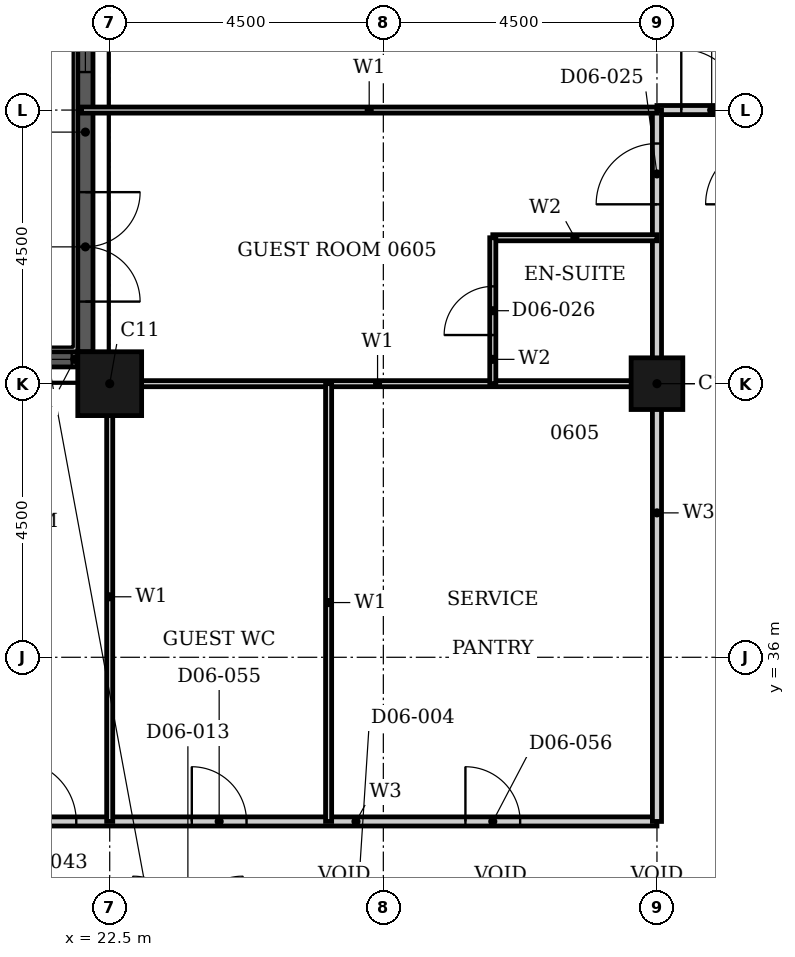
"""IFC4 building model, lengths in metres.
Left out: names, types, materials, properties, quantities, classifications, styles, units other than length and angle.
Written with IfcOpenShell. Run it as: python <this file> out.ifc"""

import sys

from ifc_helpers import new_model, si_unit, direction, frame, frame_2d, origin, origin_2d, place, context, subcontext, project, spatial, rectangle, hollow_rectangle, extrude, element, fill, save


model = new_model("IFC4")
c1 = context("Model", 3, precision=1e-05, world=origin(), true_north=direction((0.0, 1.0)))
c2 = subcontext(c1, "Body", "Model", "MODEL_VIEW")
j1 = project(units=[si_unit("LENGTHUNIT", "METRE"), si_unit("PLANEANGLEUNIT", "RADIAN")], contexts=[c1])
p1 = place(None, origin())
s1 = spatial("IfcSite", under=j1, at=p1, CompositionType="ELEMENT")
p2 = place(p1, origin())
s2 = spatial("IfcBuilding", under=s1, at=p2, CompositionType="ELEMENT")
p3 = place(p2, frame((0.0, 0.0, 33.6)))
s3 = spatial("IfcBuildingStorey", under=s2, at=p3, CompositionType="ELEMENT", Elevation=33.6)
p4 = place(p3, frame((22.5, 40.5, 0.0), z_axis=(0.0, 0.0, 1.0), x_axis=(1.0, 0.0, 0.0)))
e1 = element("IfcColumn", 1, at=p4, inside=s3, PredefinedType="COLUMN", context=c2, shape_type="SweptSolid", body=[
    extrude(hollow_rectangle(XDim=1.05, YDim=1.05, WallThickness=0.034, at=origin_2d()), origin(), (0.0, 0.0, 1.0), 3.6),
])
p5 = place(p3, frame((31.5, 40.5, 0.0), z_axis=(0.0, 0.0, 1.0), x_axis=(1.0, 0.0, 0.0)))
e2 = element("IfcColumn", 2, at=p5, inside=s3, PredefinedType="COLUMN", context=c2, shape_type="SweptSolid", body=[
    extrude(hollow_rectangle(XDim=0.85, YDim=0.85, WallThickness=0.026, at=origin_2d()), origin(), (0.0, 0.0, 1.0), 3.6),
])
p6 = place(p3, frame((22.1, 48.975, 0.0), z_axis=(0.0, 0.0, 1.0), x_axis=(0.0, -1.0, 0.0)))
e3 = element("IfcWall", 3, at=p6, inside=s3, PredefinedType="SOLIDWALL", context=c2, shape_type="SweptSolid", body=[
    extrude(rectangle(XDim=7.95, YDim=0.25, at=frame_2d((3.975, 0.0))), origin(), (0.0, 0.0, 1.0), 3.6),
])
p7 = place(p6, frame((0.1, 0.0, 0.9)))
e4 = element("IfcOpeningElement", 4, at=p7, cuts=e3, PredefinedType="OPENING", context=c2, shape_type="SweptSolid", body=[
    extrude(rectangle(XDim=3.25, YDim=2.08, at=frame_2d((1.625, 1.04))), frame((0.0, 0.135, 0.0), z_axis=(0.0, -1.0, 0.0), x_axis=(1.0, 0.0, 0.0)), (0.0, 0.0, 1.0), 0.27),
])
p8 = place(p6, frame((5.325, 0.0, 0.0)))
e5 = element("IfcOpeningElement", 5, at=p8, cuts=e3, PredefinedType="OPENING", context=c2, shape_type="SweptSolid", body=[
    extrude(rectangle(XDim=1.8, YDim=2.4, at=frame_2d((0.9, 1.2))), frame((0.0, 0.135, 0.0), z_axis=(0.0, -1.0, 0.0), x_axis=(1.0, 0.0, 0.0)), (0.0, 0.0, 1.0), 0.27),
])
p9 = place(p3, frame((21.975, 40.9, 0.0), z_axis=(0.0, 0.0, 1.0), x_axis=(-1.0, 0.0, 0.0)))
e6 = element("IfcWall", 6, at=p9, inside=s3, PredefinedType="SOLIDWALL", context=c2, shape_type="SweptSolid", body=[
    extrude(rectangle(XDim=3.45, YDim=0.25, at=frame_2d((1.725, 0.0))), origin(), (0.0, 0.0, 1.0), 3.6),
])
p10 = place(p9, frame((0.1, 0.0, 0.9)))
e7 = element("IfcOpeningElement", 7, at=p10, cuts=e6, PredefinedType="OPENING", context=c2, shape_type="SweptSolid", body=[
    extrude(rectangle(XDim=3.25, YDim=2.08, at=frame_2d((1.625, 1.04))), frame((0.0, 0.135, 0.0), z_axis=(0.0, -1.0, 0.0), x_axis=(1.0, 0.0, 0.0)), (0.0, 0.0, 1.0), 0.27),
])
p11 = place(p3, frame((16.2, 33.3, 0.0), z_axis=(0.0, 0.0, 1.0), x_axis=(1.0, 0.0, 0.0)))
e8 = element("IfcWall", 8, at=p11, inside=s3, PredefinedType="PARTITIONING", context=c2, shape_type="SweptSolid", body=[
    extrude(rectangle(XDim=15.3, YDim=0.15, at=frame_2d((7.65, 0.0))), origin(), (0.0, 0.0, 1.0), 3.3),
])
p12 = place(p11, frame((4.75, 0.0, 0.0)))
e9 = element("IfcOpeningElement", 9, at=p12, cuts=e8, PredefinedType="OPENING", context=c2, shape_type="SweptSolid", body=[
    extrude(rectangle(XDim=1.0, YDim=2.1, at=frame_2d((0.5, 1.05))), frame((0.0, 0.085, 0.0), z_axis=(0.0, -1.0, 0.0), x_axis=(1.0, 0.0, 0.0)), (0.0, 0.0, 1.0), 0.17),
])
p13 = place(p11, frame((0.45, 0.0, 0.0)))
e10 = element("IfcOpeningElement", 10, at=p13, cuts=e8, PredefinedType="OPENING", context=c2, shape_type="SweptSolid", body=[
    extrude(rectangle(XDim=0.9, YDim=2.1, at=frame_2d((0.45, 1.05))), frame((0.0, 0.085, 0.0), z_axis=(0.0, -1.0, 0.0), x_axis=(1.0, 0.0, 0.0)), (0.0, 0.0, 1.0), 0.17),
])
p14 = place(p11, frame((7.65, 0.0, 0.0)))
e11 = element("IfcOpeningElement", 11, at=p14, cuts=e8, PredefinedType="OPENING", context=c2, shape_type="SweptSolid", body=[
    extrude(rectangle(XDim=0.9, YDim=2.1, at=frame_2d((0.45, 1.05))), frame((0.0, 0.085, 0.0), z_axis=(0.0, -1.0, 0.0), x_axis=(1.0, 0.0, 0.0)), (0.0, 0.0, 1.0), 0.17),
])
p15 = place(p11, frame((12.15, 0.0, 0.0)))
e12 = element("IfcOpeningElement", 12, at=p15, cuts=e8, PredefinedType="OPENING", context=c2, shape_type="SweptSolid", body=[
    extrude(rectangle(XDim=0.9, YDim=2.1, at=frame_2d((0.45, 1.05))), frame((0.0, 0.085, 0.0), z_axis=(0.0, -1.0, 0.0), x_axis=(1.0, 0.0, 0.0)), (0.0, 0.0, 1.0), 0.17),
])
p16 = place(p3, frame((31.5, 45.0, 0.0), z_axis=(0.0, 0.0, 1.0), x_axis=(1.0, 0.0, 0.0)))
e13 = element("IfcWall", 13, at=p16, inside=s3, PredefinedType="PARTITIONING", context=c2, shape_type="SweptSolid", body=[
    extrude(rectangle(XDim=1.8, YDim=0.15, at=frame_2d((0.9, 0.0))), origin(), (0.0, 0.0, 1.0), 3.3),
])
p17 = place(p16, frame((0.4, 0.0, 0.0)))
e14 = element("IfcOpeningElement", 14, at=p17, cuts=e13, PredefinedType="OPENING", context=c2, shape_type="SweptSolid", body=[
    extrude(rectangle(XDim=1.0, YDim=2.1, at=frame_2d((0.5, 1.05))), frame((0.0, 0.085, 0.0), z_axis=(0.0, -1.0, 0.0), x_axis=(1.0, 0.0, 0.0)), (0.0, 0.0, 1.0), 0.17),
])
p18 = place(p3, frame((31.5, 33.3, 0.0), z_axis=(0.0, 0.0, 1.0), x_axis=(0.0, 1.0, 0.0)))
e15 = element("IfcWall", 15, at=p18, inside=s3, PredefinedType="PARTITIONING", context=c2, shape_type="SweptSolid", body=[
    extrude(rectangle(XDim=11.7, YDim=0.15, at=frame_2d((5.85, 0.0))), origin(), (0.0, 0.0, 1.0), 2.58),
])
p19 = place(p18, frame((10.15, 0.0, 0.0)))
e16 = element("IfcOpeningElement", 16, at=p19, cuts=e15, PredefinedType="OPENING", context=c2, shape_type="SweptSolid", body=[
    extrude(rectangle(XDim=1.0, YDim=2.1, at=frame_2d((0.5, 1.05))), frame((0.0, 0.085, 0.0), z_axis=(0.0, -1.0, 0.0), x_axis=(1.0, 0.0, 0.0)), (0.0, 0.0, 1.0), 0.17),
])
p20 = place(p3, frame((22.31, 40.5, 0.0), z_axis=(0.0, 0.0, 1.0), x_axis=(1.0, 0.0, 0.0)))
e17 = element("IfcWall", 17, at=p20, inside=s3, PredefinedType="PARTITIONING", context=c2, shape_type="SweptSolid", body=[
    extrude(rectangle(XDim=9.19, YDim=0.1, at=frame_2d((4.595, 0.0))), origin(), (0.0, 0.0, 1.0), 2.38),
])
p21 = place(p3, frame((22.035, 45.0, 0.0), z_axis=(0.0, 0.0, 1.0), x_axis=(1.0, 0.0, 0.0)))
e18 = element("IfcWall", 18, at=p21, inside=s3, PredefinedType="PARTITIONING", context=c2, shape_type="SweptSolid", body=[
    extrude(rectangle(XDim=9.465, YDim=0.1, at=frame_2d((4.732, 0.0))), origin(), (0.0, 0.0, 1.0), 3.3),
])
p22 = place(p3, frame((22.5, 33.3, 0.0), z_axis=(0.0, 0.0, 1.0), x_axis=(0.0, 1.0, 0.0)))
e19 = element("IfcWall", 19, at=p22, inside=s3, PredefinedType="PARTITIONING", context=c2, shape_type="SweptSolid", body=[
    extrude(rectangle(XDim=7.39, YDim=0.1, at=frame_2d((3.695, 0.0))), origin(), (0.0, 0.0, 1.0), 3.3),
])
p23 = place(p3, frame((26.1, 33.3, 0.0), z_axis=(0.0, 0.0, 1.0), x_axis=(0.0, 1.0, 0.0)))
e20 = element("IfcWall", 20, at=p23, inside=s3, PredefinedType="PARTITIONING", context=c2, shape_type="SweptSolid", body=[
    extrude(rectangle(XDim=7.2, YDim=0.1, at=frame_2d((3.6, 0.0))), origin(), (0.0, 0.0, 1.0), 3.3),
])
p24 = place(p3, frame((28.8, 42.9, 0.0), z_axis=(0.0, 0.0, 1.0), x_axis=(1.0, 0.0, 0.0)))
e21 = element("IfcWall", 21, at=p24, inside=s3, PredefinedType="PARTITIONING", context=c2, shape_type="SweptSolid", body=[
    extrude(rectangle(XDim=2.7, YDim=0.1, at=frame_2d((1.35, 0.0))), origin(), (0.0, 0.0, 1.0), 3.3),
])
p25 = place(p3, frame((28.8, 40.5, 0.0), z_axis=(0.0, 0.0, 1.0), x_axis=(0.0, 1.0, 0.0)))
e22 = element("IfcWall", 22, at=p25, inside=s3, PredefinedType="PARTITIONING", context=c2, shape_type="SweptSolid", body=[
    extrude(rectangle(XDim=2.4, YDim=0.1, at=frame_2d((1.2, 0.0))), origin(), (0.0, 0.0, 1.0), 3.3),
])
p26 = place(p25, frame((0.8, 0.0, 0.0)))
e23 = element("IfcOpeningElement", 23, at=p26, cuts=e22, PredefinedType="OPENING", context=c2, shape_type="SweptSolid", body=[
    extrude(rectangle(XDim=0.8, YDim=2.1, at=frame_2d((0.4, 1.05))), frame((0.0, 0.06, 0.0), z_axis=(0.0, -1.0, 0.0), x_axis=(1.0, 0.0, 0.0)), (0.0, 0.0, 1.0), 0.12),
])
p27 = place(p7, origin())
e24 = element("IfcWindow", 24, at=p27, inside=s3, PartitioningType="SINGLE_PANEL", PredefinedType="WINDOW", context=c2, shape_type="SweptSolid", body=[
    extrude(rectangle(XDim=3.25, YDim=2.08, at=frame_2d((1.625, 1.04))), frame((0.0, 0.03, 0.0), z_axis=(0.0, -1.0, 0.0), x_axis=(1.0, 0.0, 0.0)), (0.0, 0.0, 1.0), 0.06),
])
fill(e4, e24)
p28 = place(p8, origin())
e25 = element("IfcDoor", 25, at=p28, inside=s3, OperationType="DOUBLE_DOOR_SINGLE_SWING", PredefinedType="DOOR", context=c2, shape_type="SweptSolid", body=[
    extrude(rectangle(XDim=1.8, YDim=2.4, at=frame_2d((0.9, 1.2))), frame((0.0, 0.025, 0.0), z_axis=(0.0, -1.0, 0.0), x_axis=(1.0, 0.0, 0.0)), (0.0, 0.0, 1.0), 0.05),
])
fill(e5, e25)
p29 = place(p10, origin())
e26 = element("IfcWindow", 26, at=p29, inside=s3, PartitioningType="SINGLE_PANEL", PredefinedType="WINDOW", context=c2, shape_type="SweptSolid", body=[
    extrude(rectangle(XDim=3.25, YDim=2.08, at=frame_2d((1.625, 1.04))), frame((0.0, 0.03, 0.0), z_axis=(0.0, -1.0, 0.0), x_axis=(1.0, 0.0, 0.0)), (0.0, 0.0, 1.0), 0.06),
])
fill(e7, e26)
p30 = place(p19, origin())
e27 = element("IfcDoor", 27, at=p30, inside=s3, OperationType="SINGLE_SWING_RIGHT", PredefinedType="DOOR", context=c2, shape_type="SweptSolid", body=[
    extrude(rectangle(XDim=1.0, YDim=2.1, at=frame_2d((0.5, 1.05))), frame((0.0, 0.025, 0.0), z_axis=(0.0, -1.0, 0.0), x_axis=(1.0, 0.0, 0.0)), (0.0, 0.0, 1.0), 0.05),
])
fill(e16, e27)
p31 = place(p26, origin())
e28 = element("IfcDoor", 28, at=p31, inside=s3, OperationType="SINGLE_SWING_RIGHT", PredefinedType="DOOR", context=c2, shape_type="SweptSolid", body=[
    extrude(rectangle(XDim=0.8, YDim=2.1, at=frame_2d((0.4, 1.05))), frame((0.0, 0.025, 0.0), z_axis=(0.0, -1.0, 0.0), x_axis=(1.0, 0.0, 0.0)), (0.0, 0.0, 1.0), 0.05),
])
fill(e23, e28)
p32 = place(p17, origin())
e29 = element("IfcDoor", 29, at=p32, inside=s3, OperationType="SINGLE_SWING_LEFT", PredefinedType="DOOR", context=c2, shape_type="SweptSolid", body=[
    extrude(rectangle(XDim=1.0, YDim=2.1, at=frame_2d((0.5, 1.05))), frame((0.0, 0.025, 0.0), z_axis=(0.0, -1.0, 0.0), x_axis=(1.0, 0.0, 0.0)), (0.0, 0.0, 1.0), 0.05),
])
fill(e14, e29)
p33 = place(p12, origin())
e30 = element("IfcDoor", 30, at=p33, inside=s3, OperationType="SINGLE_SWING_RIGHT", PredefinedType="DOOR", context=c2, shape_type="SweptSolid", body=[
    extrude(rectangle(XDim=1.0, YDim=2.1, at=frame_2d((0.5, 1.05))), frame((0.0, 0.025, 0.0), z_axis=(0.0, -1.0, 0.0), x_axis=(1.0, 0.0, 0.0)), (0.0, 0.0, 1.0), 0.05),
])
fill(e9, e30)
p34 = place(p14, origin())
e31 = element("IfcDoor", 31, at=p34, inside=s3, OperationType="SINGLE_SWING_RIGHT", PredefinedType="DOOR", context=c2, shape_type="SweptSolid", body=[
    extrude(rectangle(XDim=0.9, YDim=2.1, at=frame_2d((0.45, 1.05))), frame((0.0, 0.025, 0.0), z_axis=(0.0, -1.0, 0.0), x_axis=(1.0, 0.0, 0.0)), (0.0, 0.0, 1.0), 0.05),
])
fill(e11, e31)
p35 = place(p15, origin())
e32 = element("IfcDoor", 32, at=p35, inside=s3, OperationType="SINGLE_SWING_LEFT", PredefinedType="DOOR", context=c2, shape_type="SweptSolid", body=[
    extrude(rectangle(XDim=0.9, YDim=2.1, at=frame_2d((0.45, 1.05))), frame((0.0, 0.025, 0.0), z_axis=(0.0, -1.0, 0.0), x_axis=(1.0, 0.0, 0.0)), (0.0, 0.0, 1.0), 0.05),
])
fill(e12, e32)
save(model, sys.argv[1])
